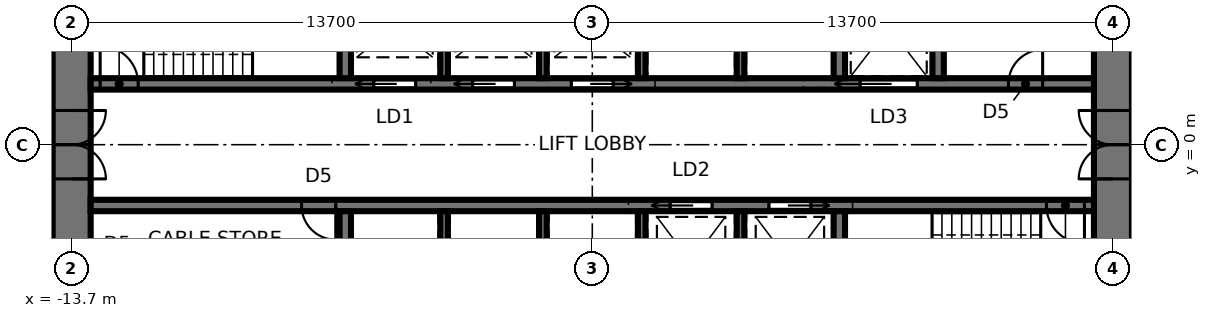
"""IFC4 building model, lengths in metres.
Left out: names, types, materials, properties, quantities, classifications, styles, units other than length and angle.
Written with IfcOpenShell. Run it as: python <this file> out.ifc"""

import sys

from ifc_helpers import new_model, si_unit, direction, frame, frame_2d, origin, place, context, subcontext, project, spatial, rectangle, extrude, element, fill, save


model = new_model("IFC4")
c1 = context("Model", 3, precision=1e-05, world=origin(), true_north=direction((0.0, 1.0)))
c2 = subcontext(c1, "Body", "Model", "MODEL_VIEW")
j1 = project(units=[si_unit("LENGTHUNIT", "METRE"), si_unit("PLANEANGLEUNIT", "RADIAN")], contexts=[c1])
p1 = place(None, origin())
s1 = spatial("IfcSite", under=j1, at=p1, CompositionType="ELEMENT")
p2 = place(p1, origin())
s2 = spatial("IfcBuilding", under=s1, at=p2, CompositionType="ELEMENT")
p3 = place(p2, frame((0.0, 0.0, 19.6)))
s3 = spatial("IfcBuildingStorey", under=s2, at=p3, CompositionType="ELEMENT", Elevation=19.6)
p4 = place(p3, frame((13.7, -9.5, 0.0), z_axis=(0.0, 0.0, 1.0), x_axis=(0.0, 1.0, 0.0)))
e1 = element("IfcWall", 1, at=p4, inside=s3, PredefinedType="SHEAR", context=c2, shape_type="SweptSolid", body=[
    extrude(rectangle(XDim=19.0, YDim=1.0, at=frame_2d((9.5, 0.0))), origin(), (0.0, 0.0, 1.0), 4.2),
])
p5 = place(p4, frame((8.6, 0.0, 0.0)))
e2 = element("IfcOpeningElement", 2, at=p5, cuts=e1, PredefinedType="OPENING", context=c2, shape_type="SweptSolid", body=[
    extrude(rectangle(XDim=1.8, YDim=2.4, at=frame_2d((0.9, 1.2))), frame((0.0, 0.51, 0.0), z_axis=(0.0, -1.0, 0.0), x_axis=(1.0, 0.0, 0.0)), (0.0, 0.0, 1.0), 1.02),
])
p6 = place(p3, frame((-13.7, 9.5, 0.0), z_axis=(0.0, 0.0, 1.0), x_axis=(0.0, -1.0, 0.0)))
e3 = element("IfcWall", 3, at=p6, inside=s3, PredefinedType="SHEAR", context=c2, shape_type="SweptSolid", body=[
    extrude(rectangle(XDim=19.0, YDim=1.0, at=frame_2d((9.5, 0.0))), origin(), (0.0, 0.0, 1.0), 4.2),
])
p7 = place(p6, frame((8.6, 0.0, 0.0)))
e4 = element("IfcOpeningElement", 4, at=p7, cuts=e3, PredefinedType="OPENING", context=c2, shape_type="SweptSolid", body=[
    extrude(rectangle(XDim=1.8, YDim=2.4, at=frame_2d((0.9, 1.2))), frame((0.0, 0.51, 0.0), z_axis=(0.0, -1.0, 0.0), x_axis=(1.0, 0.0, 0.0)), (0.0, 0.0, 1.0), 1.02),
])
p8 = place(p3, frame((-13.2, 1.6, 0.0), z_axis=(0.0, 0.0, 1.0), x_axis=(1.0, 0.0, 0.0)))
e5 = element("IfcWall", 5, at=p8, inside=s3, PredefinedType="SHEAR", context=c2, shape_type="SweptSolid", body=[
    extrude(rectangle(XDim=26.4, YDim=0.3, at=frame_2d((13.2, 0.0))), origin(), (0.0, 0.0, 1.0), 4.2),
])
p9 = place(p8, frame((0.25, 0.0, 0.0)))
e6 = element("IfcOpeningElement", 6, at=p9, cuts=e5, PredefinedType="OPENING", context=c2, shape_type="SweptSolid", body=[
    extrude(rectangle(XDim=1.0, YDim=2.1, at=frame_2d((0.5, 1.05))), frame((0.0, 0.16, 0.0), z_axis=(0.0, -1.0, 0.0), x_axis=(1.0, 0.0, 0.0)), (0.0, 0.0, 1.0), 0.32),
])
p10 = place(p8, frame((20.25, 0.0, 0.0)))
e7 = element("IfcOpeningElement", 7, at=p10, cuts=e5, PredefinedType="OPENING", context=c2, shape_type="SweptSolid", body=[
    extrude(rectangle(XDim=1.5, YDim=2.4, at=frame_2d((0.75, 1.2))), frame((0.0, 0.16, 0.0), z_axis=(0.0, -1.0, 0.0), x_axis=(1.0, 0.0, 0.0)), (0.0, 0.0, 1.0), 0.32),
])
p11 = place(p8, frame((7.45, 0.0, 0.0)))
e8 = element("IfcOpeningElement", 8, at=p11, cuts=e5, PredefinedType="OPENING", context=c2, shape_type="SweptSolid", body=[
    extrude(rectangle(XDim=1.1, YDim=2.3, at=frame_2d((0.55, 1.15))), frame((0.0, 0.16, 0.0), z_axis=(0.0, -1.0, 0.0), x_axis=(1.0, 0.0, 0.0)), (0.0, 0.0, 1.0), 0.32),
])
p12 = place(p8, frame((10.05, 0.0, 0.0)))
e9 = element("IfcOpeningElement", 9, at=p12, cuts=e5, PredefinedType="OPENING", context=c2, shape_type="SweptSolid", body=[
    extrude(rectangle(XDim=1.1, YDim=2.3, at=frame_2d((0.55, 1.15))), frame((0.0, 0.16, 0.0), z_axis=(0.0, -1.0, 0.0), x_axis=(1.0, 0.0, 0.0)), (0.0, 0.0, 1.0), 0.32),
])
p13 = place(p8, frame((12.65, 0.0, 0.0)))
e10 = element("IfcOpeningElement", 10, at=p13, cuts=e5, PredefinedType="OPENING", context=c2, shape_type="SweptSolid", body=[
    extrude(rectangle(XDim=1.1, YDim=2.3, at=frame_2d((0.55, 1.15))), frame((0.0, 0.16, 0.0), z_axis=(0.0, -1.0, 0.0), x_axis=(1.0, 0.0, 0.0)), (0.0, 0.0, 1.0), 0.32),
])
p14 = place(p8, frame((24.15, 0.0, 0.0)))
e11 = element("IfcOpeningElement", 11, at=p14, cuts=e5, PredefinedType="OPENING", context=c2, shape_type="SweptSolid", body=[
    extrude(rectangle(XDim=0.9, YDim=2.1, at=frame_2d((0.45, 1.05))), frame((0.0, 0.16, 0.0), z_axis=(0.0, -1.0, 0.0), x_axis=(1.0, 0.0, 0.0)), (0.0, 0.0, 1.0), 0.32),
])
p15 = place(p3, frame((-13.2, -1.6, 0.0), z_axis=(0.0, 0.0, 1.0), x_axis=(1.0, 0.0, 0.0)))
e12 = element("IfcWall", 12, at=p15, inside=s3, PredefinedType="SHEAR", context=c2, shape_type="SweptSolid", body=[
    extrude(rectangle(XDim=26.4, YDim=0.3, at=frame_2d((13.2, 0.0))), origin(), (0.0, 0.0, 1.0), 4.2),
])
p16 = place(p15, frame((25.15, 0.0, 0.0)))
e13 = element("IfcOpeningElement", 13, at=p16, cuts=e12, PredefinedType="OPENING", context=c2, shape_type="SweptSolid", body=[
    extrude(rectangle(XDim=1.0, YDim=2.1, at=frame_2d((0.5, 1.05))), frame((0.0, 0.16, 0.0), z_axis=(0.0, -1.0, 0.0), x_axis=(1.0, 0.0, 0.0)), (0.0, 0.0, 1.0), 0.32),
])
p17 = place(p15, frame((15.25, 0.0, 0.0)))
e14 = element("IfcOpeningElement", 14, at=p17, cuts=e12, PredefinedType="OPENING", context=c2, shape_type="SweptSolid", body=[
    extrude(rectangle(XDim=1.1, YDim=2.3, at=frame_2d((0.55, 1.15))), frame((0.0, 0.16, 0.0), z_axis=(0.0, -1.0, 0.0), x_axis=(1.0, 0.0, 0.0)), (0.0, 0.0, 1.0), 0.32),
])
p18 = place(p15, frame((17.85, 0.0, 0.0)))
e15 = element("IfcOpeningElement", 15, at=p18, cuts=e12, PredefinedType="OPENING", context=c2, shape_type="SweptSolid", body=[
    extrude(rectangle(XDim=1.1, YDim=2.3, at=frame_2d((0.55, 1.15))), frame((0.0, 0.16, 0.0), z_axis=(0.0, -1.0, 0.0), x_axis=(1.0, 0.0, 0.0)), (0.0, 0.0, 1.0), 0.32),
])
p19 = place(p15, frame((5.55, 0.0, 0.0)))
e16 = element("IfcOpeningElement", 16, at=p19, cuts=e12, PredefinedType="OPENING", context=c2, shape_type="SweptSolid", body=[
    extrude(rectangle(XDim=0.9, YDim=2.1, at=frame_2d((0.45, 1.05))), frame((0.0, 0.16, 0.0), z_axis=(0.0, -1.0, 0.0), x_axis=(1.0, 0.0, 0.0)), (0.0, 0.0, 1.0), 0.32),
])
for number, where, z_axis, x_axis in (
    (17, (-6.5, 1.75, 0.0), (0.0, 0.0, 1.0), (0.0, 1.0, 0.0)),
    (18, (6.5, 1.75, 0.0), (0.0, 0.0, 1.0), (0.0, 1.0, 0.0)),
):
    element("IfcWall", number, at=place(p3, frame(where, z_axis=z_axis, x_axis=x_axis)), inside=s3, PredefinedType="SHEAR", context=c2, shape_type="SweptSolid", body=[
        extrude(rectangle(XDim=2.7, YDim=0.3, at=frame_2d((1.35, 0.0))), origin(), (0.0, 0.0, 1.0), 4.2),
    ])
for number, where, z_axis, x_axis in (
    (19, (-3.9, 1.75, 0.0), (0.0, 0.0, 1.0), (0.0, 1.0, 0.0)),
    (20, (-1.3, 1.75, 0.0), (0.0, 0.0, 1.0), (0.0, 1.0, 0.0)),
    (21, (1.3, 1.75, 0.0), (0.0, 0.0, 1.0), (0.0, 1.0, 0.0)),
    (22, (3.9, 1.75, 0.0), (0.0, 0.0, 1.0), (0.0, 1.0, 0.0)),
):
    element("IfcWall", number, at=place(p3, frame(where, z_axis=z_axis, x_axis=x_axis)), inside=s3, PredefinedType="SHEAR", context=c2, shape_type="SweptSolid", body=[
        extrude(rectangle(XDim=2.7, YDim=0.2, at=frame_2d((1.35, 0.0))), origin(), (0.0, 0.0, 1.0), 4.2),
    ])
for number, where, z_axis, x_axis in (
    (23, (-6.5, -1.75, 0.0), (0.0, 0.0, 1.0), (0.0, -1.0, 0.0)),
    (24, (6.5, -1.75, 0.0), (0.0, 0.0, 1.0), (0.0, -1.0, 0.0)),
):
    element("IfcWall", number, at=place(p3, frame(where, z_axis=z_axis, x_axis=x_axis)), inside=s3, PredefinedType="SHEAR", context=c2, shape_type="SweptSolid", body=[
        extrude(rectangle(XDim=2.7, YDim=0.3, at=frame_2d((1.35, 0.0))), origin(), (0.0, 0.0, 1.0), 4.2),
    ])
for number, where, z_axis, x_axis in (
    (25, (-3.9, -1.75, 0.0), (0.0, 0.0, 1.0), (0.0, -1.0, 0.0)),
    (26, (-1.3, -1.75, 0.0), (0.0, 0.0, 1.0), (0.0, -1.0, 0.0)),
    (27, (1.3, -1.75, 0.0), (0.0, 0.0, 1.0), (0.0, -1.0, 0.0)),
    (28, (3.9, -1.75, 0.0), (0.0, 0.0, 1.0), (0.0, -1.0, 0.0)),
):
    element("IfcWall", number, at=place(p3, frame(where, z_axis=z_axis, x_axis=x_axis)), inside=s3, PredefinedType="SHEAR", context=c2, shape_type="SweptSolid", body=[
        extrude(rectangle(XDim=2.7, YDim=0.2, at=frame_2d((1.35, 0.0))), origin(), (0.0, 0.0, 1.0), 4.2),
    ])
p20 = place(p3, frame((9.1, 1.75, 0.0), z_axis=(0.0, 0.0, 1.0), x_axis=(0.0, 1.0, 0.0)))
e29 = element("IfcWall", 29, at=p20, inside=s3, PredefinedType="SHEAR", context=c2, shape_type="SweptSolid", body=[
    extrude(rectangle(XDim=2.7, YDim=0.3, at=frame_2d((1.35, 0.0))), origin(), (0.0, 0.0, 1.0), 4.2),
])
p21 = place(p7, origin())
e30 = element("IfcDoor", 30, at=p21, inside=s3, OperationType="DOUBLE_DOOR_SINGLE_SWING", PredefinedType="DOOR", context=c2, shape_type="SweptSolid", body=[
    extrude(rectangle(XDim=1.72, YDim=2.36, at=frame_2d((0.9, 1.18))), frame((0.0, 0.025, 0.0), z_axis=(0.0, -1.0, 0.0), x_axis=(1.0, 0.0, 0.0)), (0.0, 0.0, 1.0), 0.05),
    extrude(rectangle(XDim=0.04, YDim=2.4, at=frame_2d((0.02, 1.2))), frame((0.0, 0.25, 0.0), z_axis=(0.0, -1.0, 0.0), x_axis=(1.0, 0.0, 0.0)), (0.0, 0.0, 1.0), 0.5),
    extrude(rectangle(XDim=0.04, YDim=2.4, at=frame_2d((1.78, 1.2))), frame((0.0, 0.25, 0.0), z_axis=(0.0, -1.0, 0.0), x_axis=(1.0, 0.0, 0.0)), (0.0, 0.0, 1.0), 0.5),
    extrude(rectangle(XDim=1.72, YDim=0.04, at=frame_2d((0.9, 2.38))), frame((0.0, 0.25, 0.0), z_axis=(0.0, -1.0, 0.0), x_axis=(1.0, 0.0, 0.0)), (0.0, 0.0, 1.0), 0.5),
])
fill(e4, e30)
p22 = place(p5, origin())
e31 = element("IfcDoor", 31, at=p22, inside=s3, OperationType="DOUBLE_DOOR_SINGLE_SWING", PredefinedType="DOOR", context=c2, shape_type="SweptSolid", body=[
    extrude(rectangle(XDim=1.72, YDim=2.36, at=frame_2d((0.9, 1.18))), frame((0.0, 0.025, 0.0), z_axis=(0.0, -1.0, 0.0), x_axis=(1.0, 0.0, 0.0)), (0.0, 0.0, 1.0), 0.05),
    extrude(rectangle(XDim=0.04, YDim=2.4, at=frame_2d((0.02, 1.2))), frame((0.0, 0.25, 0.0), z_axis=(0.0, -1.0, 0.0), x_axis=(1.0, 0.0, 0.0)), (0.0, 0.0, 1.0), 0.5),
    extrude(rectangle(XDim=0.04, YDim=2.4, at=frame_2d((1.78, 1.2))), frame((0.0, 0.25, 0.0), z_axis=(0.0, -1.0, 0.0), x_axis=(1.0, 0.0, 0.0)), (0.0, 0.0, 1.0), 0.5),
    extrude(rectangle(XDim=1.72, YDim=0.04, at=frame_2d((0.9, 2.38))), frame((0.0, 0.25, 0.0), z_axis=(0.0, -1.0, 0.0), x_axis=(1.0, 0.0, 0.0)), (0.0, 0.0, 1.0), 0.5),
])
fill(e2, e31)
p23 = place(p9, origin())
e32 = element("IfcDoor", 32, at=p23, inside=s3, OperationType="SINGLE_SWING_LEFT", PredefinedType="DOOR", context=c2, shape_type="SweptSolid", body=[
    extrude(rectangle(XDim=1.0, YDim=2.1, at=frame_2d((0.5, 1.05))), frame((0.0, 0.025, 0.0), z_axis=(0.0, -1.0, 0.0), x_axis=(1.0, 0.0, 0.0)), (0.0, 0.0, 1.0), 0.05),
])
fill(e6, e32)
p24 = place(p16, frame((1.0, 0.0, 0.0), z_axis=(0.0, 0.0, 1.0), x_axis=(-1.0, 0.0, 0.0)))
e33 = element("IfcDoor", 33, at=p24, inside=s3, OperationType="SINGLE_SWING_LEFT", PredefinedType="DOOR", context=c2, shape_type="SweptSolid", body=[
    extrude(rectangle(XDim=1.0, YDim=2.1, at=frame_2d((0.5, 1.05))), frame((0.0, 0.025, 0.0), z_axis=(0.0, -1.0, 0.0), x_axis=(1.0, 0.0, 0.0)), (0.0, 0.0, 1.0), 0.05),
])
fill(e13, e33)
p25 = place(p10, origin())
e34 = element("IfcDoor", 34, at=p25, inside=s3, OperationType="SLIDING_TO_LEFT", PredefinedType="DOOR", context=c2, shape_type="SweptSolid", body=[
    extrude(rectangle(XDim=1.5, YDim=2.4, at=frame_2d((0.75, 1.2))), frame((0.0, 0.025, 0.0), z_axis=(0.0, -1.0, 0.0), x_axis=(1.0, 0.0, 0.0)), (0.0, 0.0, 1.0), 0.05),
])
fill(e7, e34)
p26 = place(p11, origin())
e35 = element("IfcDoor", 35, at=p26, inside=s3, OperationType="SLIDING_TO_LEFT", PredefinedType="DOOR", context=c2, shape_type="SweptSolid", body=[
    extrude(rectangle(XDim=1.1, YDim=2.3, at=frame_2d((0.55, 1.15))), frame((0.0, 0.025, 0.0), z_axis=(0.0, -1.0, 0.0), x_axis=(1.0, 0.0, 0.0)), (0.0, 0.0, 1.0), 0.05),
])
fill(e8, e35)
p27 = place(p12, origin())
e36 = element("IfcDoor", 36, at=p27, inside=s3, OperationType="SLIDING_TO_LEFT", PredefinedType="DOOR", context=c2, shape_type="SweptSolid", body=[
    extrude(rectangle(XDim=1.1, YDim=2.3, at=frame_2d((0.55, 1.15))), frame((0.0, 0.025, 0.0), z_axis=(0.0, -1.0, 0.0), x_axis=(1.0, 0.0, 0.0)), (0.0, 0.0, 1.0), 0.05),
])
fill(e9, e36)
p28 = place(p13, origin())
e37 = element("IfcDoor", 37, at=p28, inside=s3, OperationType="SLIDING_TO_RIGHT", PredefinedType="DOOR", context=c2, shape_type="SweptSolid", body=[
    extrude(rectangle(XDim=1.1, YDim=2.3, at=frame_2d((0.55, 1.15))), frame((0.0, 0.025, 0.0), z_axis=(0.0, -1.0, 0.0), x_axis=(1.0, 0.0, 0.0)), (0.0, 0.0, 1.0), 0.05),
])
fill(e10, e37)
p29 = place(p17, frame((1.1, 0.0, 0.0), z_axis=(0.0, 0.0, 1.0), x_axis=(-1.0, 0.0, 0.0)))
e38 = element("IfcDoor", 38, at=p29, inside=s3, OperationType="SLIDING_TO_RIGHT", PredefinedType="DOOR", context=c2, shape_type="SweptSolid", body=[
    extrude(rectangle(XDim=1.1, YDim=2.3, at=frame_2d((0.55, 1.15))), frame((0.0, 0.025, 0.0), z_axis=(0.0, -1.0, 0.0), x_axis=(1.0, 0.0, 0.0)), (0.0, 0.0, 1.0), 0.05),
])
fill(e14, e38)
p30 = place(p18, frame((1.1, 0.0, 0.0), z_axis=(0.0, 0.0, 1.0), x_axis=(-1.0, 0.0, 0.0)))
e39 = element("IfcDoor", 39, at=p30, inside=s3, OperationType="SLIDING_TO_LEFT", PredefinedType="DOOR", context=c2, shape_type="SweptSolid", body=[
    extrude(rectangle(XDim=1.1, YDim=2.3, at=frame_2d((0.55, 1.15))), frame((0.0, 0.025, 0.0), z_axis=(0.0, -1.0, 0.0), x_axis=(1.0, 0.0, 0.0)), (0.0, 0.0, 1.0), 0.05),
])
fill(e15, e39)
p31 = place(p14, origin())
e40 = element("IfcDoor", 40, at=p31, inside=s3, OperationType="SINGLE_SWING_RIGHT", PredefinedType="DOOR", context=c2, shape_type="SweptSolid", body=[
    extrude(rectangle(XDim=0.9, YDim=2.1, at=frame_2d((0.45, 1.05))), frame((0.0, 0.025, 0.0), z_axis=(0.0, -1.0, 0.0), x_axis=(1.0, 0.0, 0.0)), (0.0, 0.0, 1.0), 0.05),
])
fill(e11, e40)
p32 = place(p19, frame((0.9, 0.0, 0.0), z_axis=(0.0, 0.0, 1.0), x_axis=(-1.0, 0.0, 0.0)))
e41 = element("IfcDoor", 41, at=p32, inside=s3, OperationType="SINGLE_SWING_LEFT", PredefinedType="DOOR", context=c2, shape_type="SweptSolid", body=[
    extrude(rectangle(XDim=0.9, YDim=2.1, at=frame_2d((0.45, 1.05))), frame((0.0, 0.025, 0.0), z_axis=(0.0, -1.0, 0.0), x_axis=(1.0, 0.0, 0.0)), (0.0, 0.0, 1.0), 0.05),
])
fill(e16, e41)
save(model, sys.argv[1])
